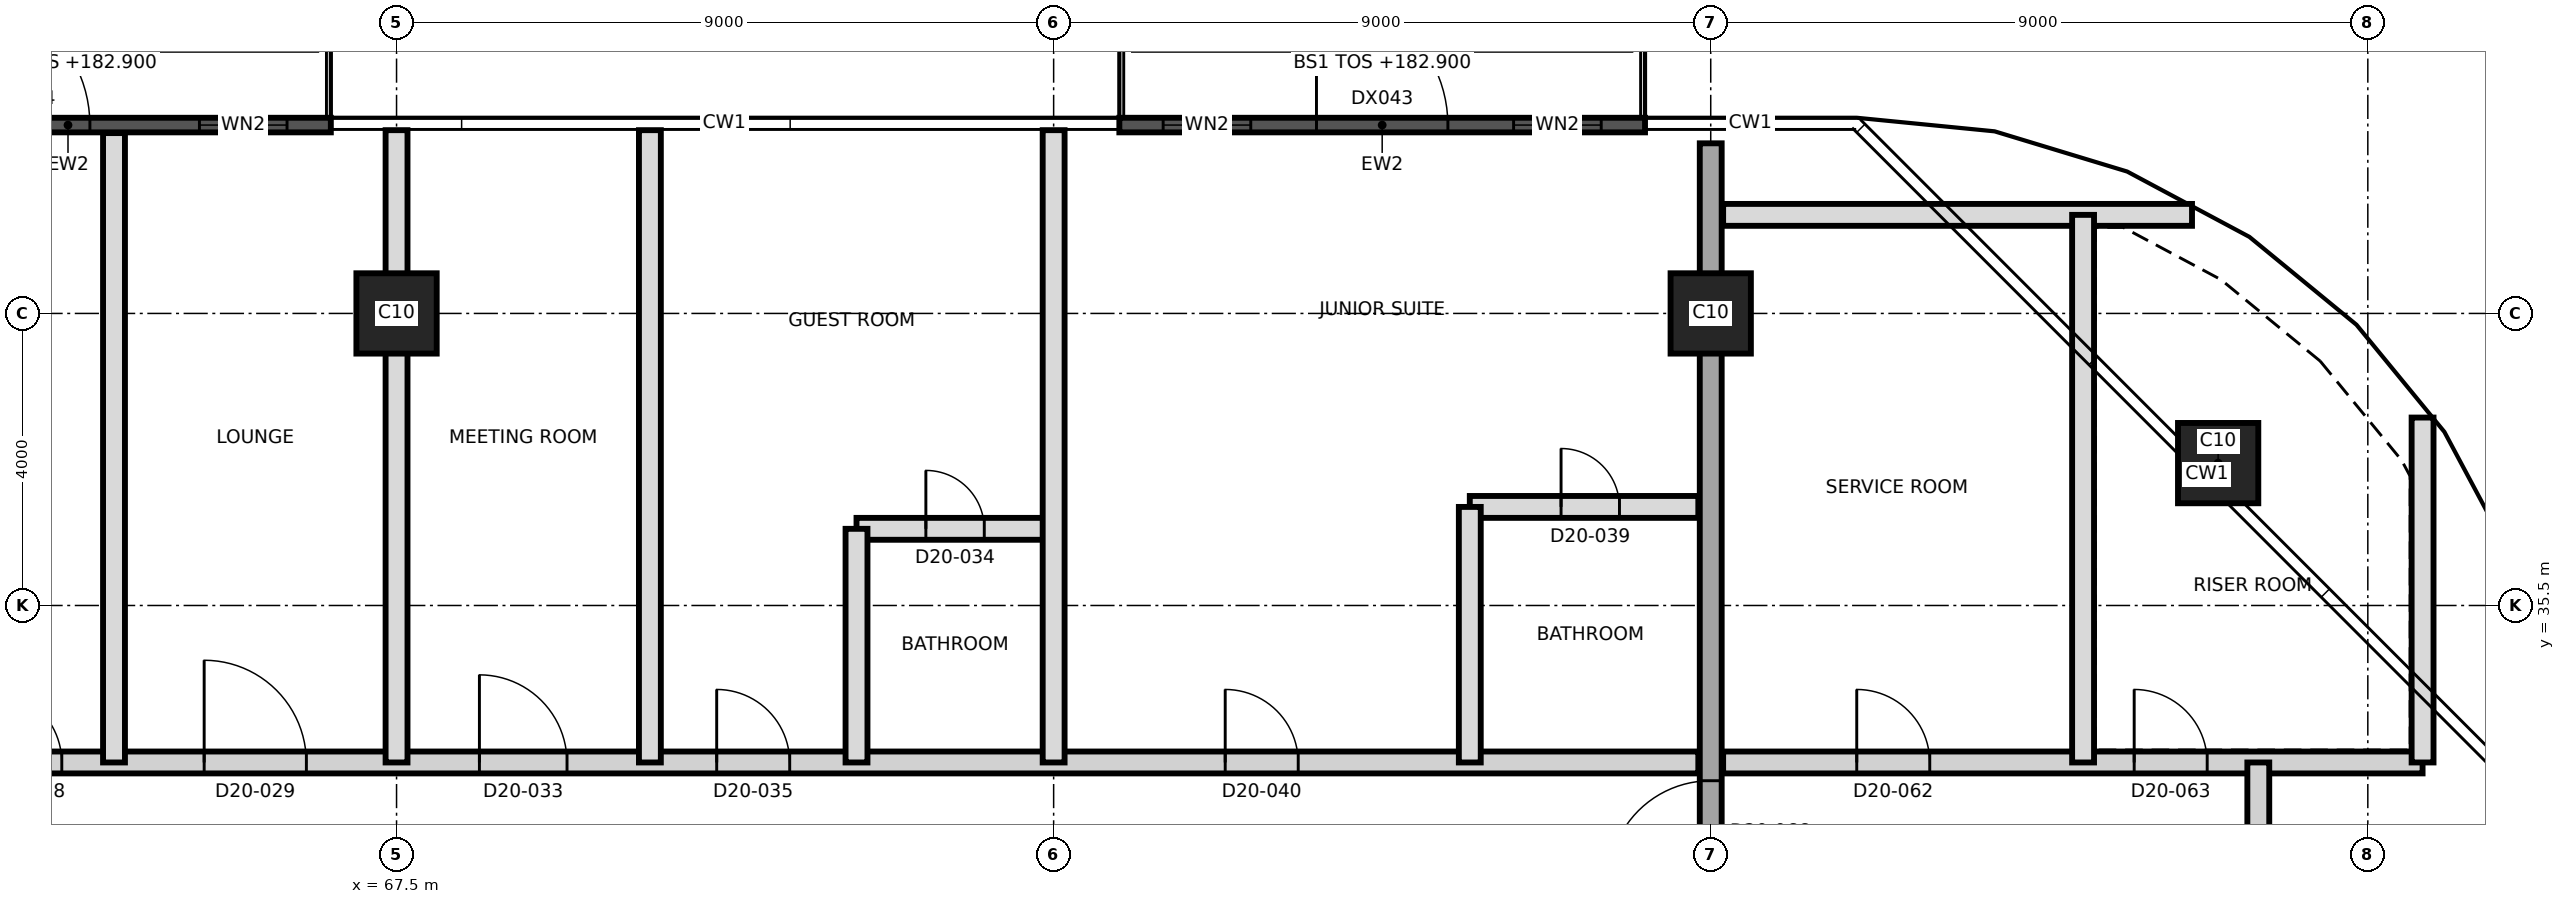
"""IFC4 building model, lengths in metres.
Left out: names, types, materials, properties, quantities, classifications, styles, units other than length and angle.
Written with IfcOpenShell. Run it as: python <this file> out.ifc"""

import sys

from ifc_helpers import new_model, si_unit, direction, frame, frame_2d, origin, origin_2d, place, context, subcontext, project, spatial, rectangle, extrude, element, fill, save


model = new_model("IFC4")
c1 = context("Model", 3, precision=1e-05, world=origin(), true_north=direction((0.0, 1.0)))
c2 = subcontext(c1, "Body", "Model", "MODEL_VIEW")
j1 = project(units=[si_unit("LENGTHUNIT", "METRE"), si_unit("PLANEANGLEUNIT", "RADIAN")], contexts=[c1])
p1 = place(None, origin())
s1 = spatial("IfcSite", under=j1, at=p1, CompositionType="ELEMENT")
p2 = place(p1, origin())
s2 = spatial("IfcBuilding", under=s1, at=p2, CompositionType="ELEMENT")
p3 = place(p2, frame((0.0, 0.0, 182.9)))
s3 = spatial("IfcBuildingStorey", under=s2, at=p3, CompositionType="ELEMENT", Elevation=182.9)
for number, where, z_axis, x_axis in (
    (1, (92.45, 37.45, 0.0), (0.0, 0.0, 1.0), (1.0, 0.0, 0.0)),
    (2, (67.5, 39.5, 0.0), (0.0, 0.0, 1.0), (1.0, 0.0, 0.0)),
    (3, (85.5, 39.5, 0.0), (0.0, 0.0, 1.0), (1.0, 0.0, 0.0)),
):
    element("IfcColumn", number, at=place(p3, frame(where, z_axis=z_axis, x_axis=x_axis)), inside=s3, PredefinedType="COLUMN", context=c2, shape_type="SweptSolid", body=[
        extrude(rectangle(XDim=1.1, YDim=1.1, at=origin_2d()), origin(), (0.0, 0.0, 1.0), 3.7),
    ])
p4 = place(p3, frame((85.5, 19.17, 0.0), z_axis=(0.0, 0.0, 1.0), x_axis=(0.0, 1.0, 0.0)))
e4 = element("IfcWall", 4, at=p4, inside=s3, PredefinedType="SHEAR", context=c2, shape_type="SweptSolid", body=[
    extrude(rectangle(XDim=22.66, YDim=0.3, at=frame_2d((11.33, 0.0))), origin(), (0.0, 0.0, 1.0), 3.7),
])
p5 = place(p4, frame((12.53, 0.0, 0.0)))
e5 = element("IfcOpeningElement", 5, at=p5, cuts=e4, PredefinedType="OPENING", context=c2, shape_type="SweptSolid", body=[
    extrude(rectangle(XDim=1.4, YDim=2.1, at=frame_2d((0.7, 1.05))), frame((0.0, 0.16, 0.0), z_axis=(0.0, -1.0, 0.0), x_axis=(1.0, 0.0, 0.0)), (0.0, 0.0, 1.0), 0.32),
])
p6 = place(p3, frame((77.4, 42.08, 0.0), z_axis=(0.0, 0.0, 1.0), x_axis=(1.0, 0.0, 0.0)))
e6 = element("IfcWall", 6, at=p6, inside=s3, PredefinedType="SOLIDWALL", context=c2, shape_type="SweptSolid", body=[
    extrude(rectangle(XDim=7.2, YDim=0.2, at=frame_2d((3.6, 0.0))), origin(), (0.0, 0.0, 1.0), 3.4),
])
p7 = place(p6, frame((2.7, 0.0, 0.0)))
e7 = element("IfcOpeningElement", 7, at=p7, cuts=e6, PredefinedType="OPENING", context=c2, shape_type="SweptSolid", body=[
    extrude(rectangle(XDim=1.8, YDim=2.4, at=frame_2d((0.9, 1.2))), frame((0.0, 0.11, 0.0), z_axis=(0.0, -1.0, 0.0), x_axis=(1.0, 0.0, 0.0)), (0.0, 0.0, 1.0), 0.22),
])
p8 = place(p6, frame((5.4, 0.0, 0.9)))
e8 = element("IfcOpeningElement", 8, at=p8, cuts=e6, PredefinedType="OPENING", context=c2, shape_type="SweptSolid", body=[
    extrude(rectangle(XDim=1.2, YDim=2.1, at=frame_2d((0.6, 1.05))), frame((0.0, 0.11, 0.0), z_axis=(0.0, -1.0, 0.0), x_axis=(1.0, 0.0, 0.0)), (0.0, 0.0, 1.0), 0.22),
])
p9 = place(p6, frame((0.6, 0.0, 0.9)))
e9 = element("IfcOpeningElement", 9, at=p9, cuts=e6, PredefinedType="OPENING", context=c2, shape_type="SweptSolid", body=[
    extrude(rectangle(XDim=1.2, YDim=2.1, at=frame_2d((0.6, 1.05))), frame((0.0, 0.11, 0.0), z_axis=(0.0, -1.0, 0.0), x_axis=(1.0, 0.0, 0.0)), (0.0, 0.0, 1.0), 0.22),
])
p10 = place(p3, frame((59.4, 42.08, 0.0), z_axis=(0.0, 0.0, 1.0), x_axis=(1.0, 0.0, 0.0)))
e10 = element("IfcWall", 10, at=p10, inside=s3, PredefinedType="SOLIDWALL", context=c2, shape_type="SweptSolid", body=[
    extrude(rectangle(XDim=7.2, YDim=0.2, at=frame_2d((3.6, 0.0))), origin(), (0.0, 0.0, 1.0), 3.4),
])
p11 = place(p10, frame((2.1, 0.0, 0.0)))
e11 = element("IfcOpeningElement", 11, at=p11, cuts=e10, PredefinedType="OPENING", context=c2, shape_type="SweptSolid", body=[
    extrude(rectangle(XDim=1.8, YDim=2.4, at=frame_2d((0.9, 1.2))), frame((0.0, 0.11, 0.0), z_axis=(0.0, -1.0, 0.0), x_axis=(1.0, 0.0, 0.0)), (0.0, 0.0, 1.0), 0.22),
])
p12 = place(p10, frame((5.4, 0.0, 0.9)))
e12 = element("IfcOpeningElement", 12, at=p12, cuts=e10, PredefinedType="OPENING", context=c2, shape_type="SweptSolid", body=[
    extrude(rectangle(XDim=1.2, YDim=2.1, at=frame_2d((0.6, 1.05))), frame((0.0, 0.11, 0.0), z_axis=(0.0, -1.0, 0.0), x_axis=(1.0, 0.0, 0.0)), (0.0, 0.0, 1.0), 0.22),
])
p13 = place(p10, frame((0.6, 0.0, 0.9)))
e13 = element("IfcOpeningElement", 13, at=p13, cuts=e10, PredefinedType="OPENING", context=c2, shape_type="SweptSolid", body=[
    extrude(rectangle(XDim=1.2, YDim=2.1, at=frame_2d((0.6, 1.05))), frame((0.0, 0.11, 0.0), z_axis=(0.0, -1.0, 0.0), x_axis=(1.0, 0.0, 0.0)), (0.0, 0.0, 1.0), 0.22),
])
p14 = place(p3, frame((58.65, 33.35, 0.0), z_axis=(0.0, 0.0, 1.0), x_axis=(1.0, 0.0, 0.0)))
e14 = element("IfcWall", 14, at=p14, inside=s3, PredefinedType="PARTITIONING", context=c2, shape_type="SweptSolid", body=[
    extrude(rectangle(XDim=26.68, YDim=0.3, at=frame_2d((13.34, 0.0))), origin(), (0.0, 0.0, 1.0), 3.4),
])
p15 = place(p14, frame((3.265, 0.0, 0.0)))
e15 = element("IfcOpeningElement", 15, at=p15, cuts=e14, PredefinedType="OPENING", context=c2, shape_type="SweptSolid", body=[
    extrude(rectangle(XDim=1.0, YDim=2.1, at=frame_2d((0.5, 1.05))), frame((0.0, 0.16, 0.0), z_axis=(0.0, -1.0, 0.0), x_axis=(1.0, 0.0, 0.0)), (0.0, 0.0, 1.0), 0.32),
])
p16 = place(p14, frame((6.215, 0.0, 0.0)))
e16 = element("IfcOpeningElement", 16, at=p16, cuts=e14, PredefinedType="OPENING", context=c2, shape_type="SweptSolid", body=[
    extrude(rectangle(XDim=1.4, YDim=2.1, at=frame_2d((0.7, 1.05))), frame((0.0, 0.16, 0.0), z_axis=(0.0, -1.0, 0.0), x_axis=(1.0, 0.0, 0.0)), (0.0, 0.0, 1.0), 0.32),
])
p17 = place(p14, frame((9.985, 0.0, 0.0)))
e17 = element("IfcOpeningElement", 17, at=p17, cuts=e14, PredefinedType="OPENING", context=c2, shape_type="SweptSolid", body=[
    extrude(rectangle(XDim=1.2, YDim=2.1, at=frame_2d((0.6, 1.05))), frame((0.0, 0.16, 0.0), z_axis=(0.0, -1.0, 0.0), x_axis=(1.0, 0.0, 0.0)), (0.0, 0.0, 1.0), 0.32),
])
p18 = place(p14, frame((13.235, 0.0, 0.0)))
e18 = element("IfcOpeningElement", 18, at=p18, cuts=e14, PredefinedType="OPENING", context=c2, shape_type="SweptSolid", body=[
    extrude(rectangle(XDim=1.0, YDim=2.1, at=frame_2d((0.5, 1.05))), frame((0.0, 0.16, 0.0), z_axis=(0.0, -1.0, 0.0), x_axis=(1.0, 0.0, 0.0)), (0.0, 0.0, 1.0), 0.32),
])
p19 = place(p14, frame((20.2, 0.0, 0.0)))
e19 = element("IfcOpeningElement", 19, at=p19, cuts=e14, PredefinedType="OPENING", context=c2, shape_type="SweptSolid", body=[
    extrude(rectangle(XDim=1.0, YDim=2.1, at=frame_2d((0.5, 1.05))), frame((0.0, 0.16, 0.0), z_axis=(0.0, -1.0, 0.0), x_axis=(1.0, 0.0, 0.0)), (0.0, 0.0, 1.0), 0.32),
])
p20 = place(p3, frame((85.67, 33.35, 0.0), z_axis=(0.0, 0.0, 1.0), x_axis=(1.0, 0.0, 0.0)))
e20 = element("IfcWall", 20, at=p20, inside=s3, PredefinedType="PARTITIONING", context=c2, shape_type="SweptSolid", body=[
    extrude(rectangle(XDim=9.58, YDim=0.3, at=frame_2d((4.79, 0.0))), origin(), (0.0, 0.0, 1.0), 3.4),
])
p21 = place(p20, frame((1.83, 0.0, 0.0)))
e21 = element("IfcOpeningElement", 21, at=p21, cuts=e20, PredefinedType="OPENING", context=c2, shape_type="SweptSolid", body=[
    extrude(rectangle(XDim=1.0, YDim=2.1, at=frame_2d((0.5, 1.05))), frame((0.0, 0.16, 0.0), z_axis=(0.0, -1.0, 0.0), x_axis=(1.0, 0.0, 0.0)), (0.0, 0.0, 1.0), 0.32),
])
p22 = place(p20, frame((5.63, 0.0, 0.0)))
e22 = element("IfcOpeningElement", 22, at=p22, cuts=e20, PredefinedType="OPENING", context=c2, shape_type="SweptSolid", body=[
    extrude(rectangle(XDim=1.0, YDim=2.1, at=frame_2d((0.5, 1.05))), frame((0.0, 0.16, 0.0), z_axis=(0.0, -1.0, 0.0), x_axis=(1.0, 0.0, 0.0)), (0.0, 0.0, 1.0), 0.32),
])
p23 = place(p3, frame((73.8, 36.55, 0.0), z_axis=(0.0, 0.0, 1.0), x_axis=(1.0, 0.0, 0.0)))
e23 = element("IfcWall", 23, at=p23, inside=s3, PredefinedType="PARTITIONING", context=c2, shape_type="SweptSolid", body=[
    extrude(rectangle(XDim=2.7, YDim=0.3, at=frame_2d((1.35, 0.0))), origin(), (0.0, 0.0, 1.0), 3.4),
])
p24 = place(p23, frame((0.95, 0.0, 0.0)))
e24 = element("IfcOpeningElement", 24, at=p24, cuts=e23, PredefinedType="OPENING", context=c2, shape_type="SweptSolid", body=[
    extrude(rectangle(XDim=0.8, YDim=2.1, at=frame_2d((0.4, 1.05))), frame((0.0, 0.16, 0.0), z_axis=(0.0, -1.0, 0.0), x_axis=(1.0, 0.0, 0.0)), (0.0, 0.0, 1.0), 0.32),
])
p25 = place(p3, frame((82.2, 36.85, 0.0), z_axis=(0.0, 0.0, 1.0), x_axis=(1.0, 0.0, 0.0)))
e25 = element("IfcWall", 25, at=p25, inside=s3, PredefinedType="PARTITIONING", context=c2, shape_type="SweptSolid", body=[
    extrude(rectangle(XDim=3.13, YDim=0.3, at=frame_2d((1.565, 0.0))), origin(), (0.0, 0.0, 1.0), 3.4),
])
p26 = place(p25, frame((1.25, 0.0, 0.0)))
e26 = element("IfcOpeningElement", 26, at=p26, cuts=e25, PredefinedType="OPENING", context=c2, shape_type="SweptSolid", body=[
    extrude(rectangle(XDim=0.8, YDim=2.1, at=frame_2d((0.4, 1.05))), frame((0.0, 0.16, 0.0), z_axis=(0.0, -1.0, 0.0), x_axis=(1.0, 0.0, 0.0)), (0.0, 0.0, 1.0), 0.32),
])
p27 = place(p3, frame((85.67, 40.85, 0.0), z_axis=(0.0, 0.0, 1.0), x_axis=(1.0, 0.0, 0.0)))
e27 = element("IfcWall", 27, at=p27, inside=s3, PredefinedType="PARTITIONING", context=c2, shape_type="SweptSolid", body=[
    extrude(rectangle(XDim=6.422, YDim=0.3, at=frame_2d((3.211, 0.0))), origin(), (0.0, 0.0, 1.0), 3.4),
])
p28 = place(p3, frame((63.63, 33.35, 0.0), z_axis=(0.0, 0.0, 1.0), x_axis=(0.0, 1.0, 0.0)))
e28 = element("IfcWall", 28, at=p28, inside=s3, PredefinedType="PARTITIONING", context=c2, shape_type="SweptSolid", body=[
    extrude(rectangle(XDim=8.62, YDim=0.3, at=frame_2d((4.31, 0.0))), origin(), (0.0, 0.0, 1.0), 3.4),
])
for number, where, z_axis, x_axis in (
    (29, (67.5, 33.35, 0.0), (0.0, 0.0, 1.0), (0.0, 1.0, 0.0)),
    (30, (70.97, 33.35, 0.0), (0.0, 0.0, 1.0), (0.0, 1.0, 0.0)),
):
    element("IfcWall", number, at=place(p3, frame(where, z_axis=z_axis, x_axis=x_axis)), inside=s3, PredefinedType="PARTITIONING", context=c2, shape_type="SweptSolid", body=[
        extrude(rectangle(XDim=8.66, YDim=0.3, at=frame_2d((4.33, 0.0))), origin(), (0.0, 0.0, 1.0), 3.4),
    ])
p29 = place(p3, frame((73.8, 33.35, 0.0), z_axis=(0.0, 0.0, 1.0), x_axis=(0.0, 1.0, 0.0)))
e31 = element("IfcWall", 31, at=p29, inside=s3, PredefinedType="PARTITIONING", context=c2, shape_type="SweptSolid", body=[
    extrude(rectangle(XDim=3.2, YDim=0.3, at=frame_2d((1.6, 0.0))), origin(), (0.0, 0.0, 1.0), 3.4),
])
p30 = place(p3, frame((76.5, 33.35, 0.0), z_axis=(0.0, 0.0, 1.0), x_axis=(0.0, 1.0, 0.0)))
e32 = element("IfcWall", 32, at=p30, inside=s3, PredefinedType="PARTITIONING", context=c2, shape_type="SweptSolid", body=[
    extrude(rectangle(XDim=8.66, YDim=0.3, at=frame_2d((4.33, 0.0))), origin(), (0.0, 0.0, 1.0), 3.4),
])
p31 = place(p3, frame((82.2, 33.35, 0.0), z_axis=(0.0, 0.0, 1.0), x_axis=(0.0, 1.0, 0.0)))
e33 = element("IfcWall", 33, at=p31, inside=s3, PredefinedType="PARTITIONING", context=c2, shape_type="SweptSolid", body=[
    extrude(rectangle(XDim=3.5, YDim=0.3, at=frame_2d((1.75, 0.0))), origin(), (0.0, 0.0, 1.0), 3.4),
])
p32 = place(p3, frame((90.6, 33.35, 0.0), z_axis=(0.0, 0.0, 1.0), x_axis=(0.0, 1.0, 0.0)))
e34 = element("IfcWall", 34, at=p32, inside=s3, PredefinedType="PARTITIONING", context=c2, shape_type="SweptSolid", body=[
    extrude(rectangle(XDim=7.5, YDim=0.3, at=frame_2d((3.75, 0.0))), origin(), (0.0, 0.0, 1.0), 3.4),
])
p33 = place(p3, frame((93.0, 30.65, 0.0), z_axis=(0.0, 0.0, 1.0), x_axis=(0.0, 1.0, 0.0)))
e35 = element("IfcWall", 35, at=p33, inside=s3, PredefinedType="PARTITIONING", context=c2, shape_type="SweptSolid", body=[
    extrude(rectangle(XDim=2.7, YDim=0.3, at=frame_2d((1.35, 0.0))), origin(), (0.0, 0.0, 1.0), 3.4),
])
p34 = place(p3, frame((95.25, 33.35, 0.0), z_axis=(0.0, 0.0, 1.0), x_axis=(0.0, 1.0, 0.0)))
e36 = element("IfcWall", 36, at=p34, inside=s3, PredefinedType="PARTITIONING", context=c2, shape_type="SweptSolid", body=[
    extrude(rectangle(XDim=4.724, YDim=0.3, at=frame_2d((2.362, 0.0))), origin(), (0.0, 0.0, 1.0), 3.4),
])
p35 = place(p7, origin())
e37 = element("IfcDoor", 37, at=p35, inside=s3, OperationType="SINGLE_SWING_LEFT", PredefinedType="DOOR", context=c2, shape_type="SweptSolid", body=[
    extrude(rectangle(XDim=1.8, YDim=2.4, at=frame_2d((0.9, 1.2))), frame((0.0, 0.025, 0.0), z_axis=(0.0, -1.0, 0.0), x_axis=(1.0, 0.0, 0.0)), (0.0, 0.0, 1.0), 0.05),
])
fill(e7, e37)
p36 = place(p8, origin())
e38 = element("IfcWindow", 38, at=p36, inside=s3, PartitioningType="SINGLE_PANEL", PredefinedType="WINDOW", context=c2, shape_type="SweptSolid", body=[
    extrude(rectangle(XDim=1.2, YDim=2.1, at=frame_2d((0.6, 1.05))), frame((0.0, 0.03, 0.0), z_axis=(0.0, -1.0, 0.0), x_axis=(1.0, 0.0, 0.0)), (0.0, 0.0, 1.0), 0.06),
])
fill(e8, e38)
p37 = place(p9, origin())
e39 = element("IfcWindow", 39, at=p37, inside=s3, PartitioningType="SINGLE_PANEL", PredefinedType="WINDOW", context=c2, shape_type="SweptSolid", body=[
    extrude(rectangle(XDim=1.2, YDim=2.1, at=frame_2d((0.6, 1.05))), frame((0.0, 0.03, 0.0), z_axis=(0.0, -1.0, 0.0), x_axis=(1.0, 0.0, 0.0)), (0.0, 0.0, 1.0), 0.06),
])
fill(e9, e39)
p38 = place(p11, origin())
e40 = element("IfcDoor", 40, at=p38, inside=s3, OperationType="SINGLE_SWING_LEFT", PredefinedType="DOOR", context=c2, shape_type="SweptSolid", body=[
    extrude(rectangle(XDim=1.8, YDim=2.4, at=frame_2d((0.9, 1.2))), frame((0.0, 0.025, 0.0), z_axis=(0.0, -1.0, 0.0), x_axis=(1.0, 0.0, 0.0)), (0.0, 0.0, 1.0), 0.05),
])
fill(e11, e40)
p39 = place(p12, origin())
e41 = element("IfcWindow", 41, at=p39, inside=s3, PartitioningType="SINGLE_PANEL", PredefinedType="WINDOW", context=c2, shape_type="SweptSolid", body=[
    extrude(rectangle(XDim=1.2, YDim=2.1, at=frame_2d((0.6, 1.05))), frame((0.0, 0.03, 0.0), z_axis=(0.0, -1.0, 0.0), x_axis=(1.0, 0.0, 0.0)), (0.0, 0.0, 1.0), 0.06),
])
fill(e12, e41)
p40 = place(p15, origin())
e42 = element("IfcDoor", 42, at=p40, inside=s3, OperationType="SINGLE_SWING_LEFT", PredefinedType="DOOR", context=c2, shape_type="SweptSolid", body=[
    extrude(rectangle(XDim=1.0, YDim=2.1, at=frame_2d((0.5, 1.05))), frame((0.0, 0.025, 0.0), z_axis=(0.0, -1.0, 0.0), x_axis=(1.0, 0.0, 0.0)), (0.0, 0.0, 1.0), 0.05),
])
fill(e15, e42)
p41 = place(p16, origin())
e43 = element("IfcDoor", 43, at=p41, inside=s3, OperationType="SINGLE_SWING_RIGHT", PredefinedType="DOOR", context=c2, shape_type="SweptSolid", body=[
    extrude(rectangle(XDim=1.4, YDim=2.1, at=frame_2d((0.7, 1.05))), frame((0.0, 0.025, 0.0), z_axis=(0.0, -1.0, 0.0), x_axis=(1.0, 0.0, 0.0)), (0.0, 0.0, 1.0), 0.05),
])
fill(e16, e43)
p42 = place(p17, origin())
e44 = element("IfcDoor", 44, at=p42, inside=s3, OperationType="SINGLE_SWING_LEFT", PredefinedType="DOOR", context=c2, shape_type="SweptSolid", body=[
    extrude(rectangle(XDim=1.2, YDim=2.1, at=frame_2d((0.6, 1.05))), frame((0.0, 0.025, 0.0), z_axis=(0.0, -1.0, 0.0), x_axis=(1.0, 0.0, 0.0)), (0.0, 0.0, 1.0), 0.05),
])
fill(e17, e44)
p43 = place(p24, origin())
e45 = element("IfcDoor", 45, at=p43, inside=s3, OperationType="SINGLE_SWING_RIGHT", PredefinedType="DOOR", context=c2, shape_type="SweptSolid", body=[
    extrude(rectangle(XDim=0.8, YDim=2.1, at=frame_2d((0.4, 1.05))), frame((0.0, 0.025, 0.0), z_axis=(0.0, -1.0, 0.0), x_axis=(1.0, 0.0, 0.0)), (0.0, 0.0, 1.0), 0.05),
])
fill(e24, e45)
p44 = place(p18, origin())
e46 = element("IfcDoor", 46, at=p44, inside=s3, OperationType="SINGLE_SWING_LEFT", PredefinedType="DOOR", context=c2, shape_type="SweptSolid", body=[
    extrude(rectangle(XDim=1.0, YDim=2.1, at=frame_2d((0.5, 1.05))), frame((0.0, 0.025, 0.0), z_axis=(0.0, -1.0, 0.0), x_axis=(1.0, 0.0, 0.0)), (0.0, 0.0, 1.0), 0.05),
])
fill(e18, e46)
p45 = place(p26, origin())
e47 = element("IfcDoor", 47, at=p45, inside=s3, OperationType="SINGLE_SWING_LEFT", PredefinedType="DOOR", context=c2, shape_type="SweptSolid", body=[
    extrude(rectangle(XDim=0.8, YDim=2.1, at=frame_2d((0.4, 1.05))), frame((0.0, 0.025, 0.0), z_axis=(0.0, -1.0, 0.0), x_axis=(1.0, 0.0, 0.0)), (0.0, 0.0, 1.0), 0.05),
])
fill(e26, e47)
p46 = place(p19, origin())
e48 = element("IfcDoor", 48, at=p46, inside=s3, OperationType="SINGLE_SWING_LEFT", PredefinedType="DOOR", context=c2, shape_type="SweptSolid", body=[
    extrude(rectangle(XDim=1.0, YDim=2.1, at=frame_2d((0.5, 1.05))), frame((0.0, 0.025, 0.0), z_axis=(0.0, -1.0, 0.0), x_axis=(1.0, 0.0, 0.0)), (0.0, 0.0, 1.0), 0.05),
])
fill(e19, e48)
p47 = place(p21, origin())
e49 = element("IfcDoor", 49, at=p47, inside=s3, OperationType="SINGLE_SWING_LEFT", PredefinedType="DOOR", context=c2, shape_type="SweptSolid", body=[
    extrude(rectangle(XDim=1.0, YDim=2.1, at=frame_2d((0.5, 1.05))), frame((0.0, 0.025, 0.0), z_axis=(0.0, -1.0, 0.0), x_axis=(1.0, 0.0, 0.0)), (0.0, 0.0, 1.0), 0.05),
])
fill(e21, e49)
p48 = place(p22, origin())
e50 = element("IfcDoor", 50, at=p48, inside=s3, OperationType="SINGLE_SWING_RIGHT", PredefinedType="DOOR", context=c2, shape_type="SweptSolid", body=[
    extrude(rectangle(XDim=1.0, YDim=2.1, at=frame_2d((0.5, 1.05))), frame((0.0, 0.025, 0.0), z_axis=(0.0, -1.0, 0.0), x_axis=(1.0, 0.0, 0.0)), (0.0, 0.0, 1.0), 0.05),
])
fill(e22, e50)
p49 = place(p5, origin())
e51 = element("IfcDoor", 51, at=p49, inside=s3, OperationType="SINGLE_SWING_RIGHT", PredefinedType="DOOR", context=c2, shape_type="SweptSolid", body=[
    extrude(rectangle(XDim=1.4, YDim=2.1, at=frame_2d((0.7, 1.05))), frame((0.0, 0.025, 0.0), z_axis=(0.0, -1.0, 0.0), x_axis=(1.0, 0.0, 0.0)), (0.0, 0.0, 1.0), 0.05),
])
fill(e5, e51)
save(model, sys.argv[1])
